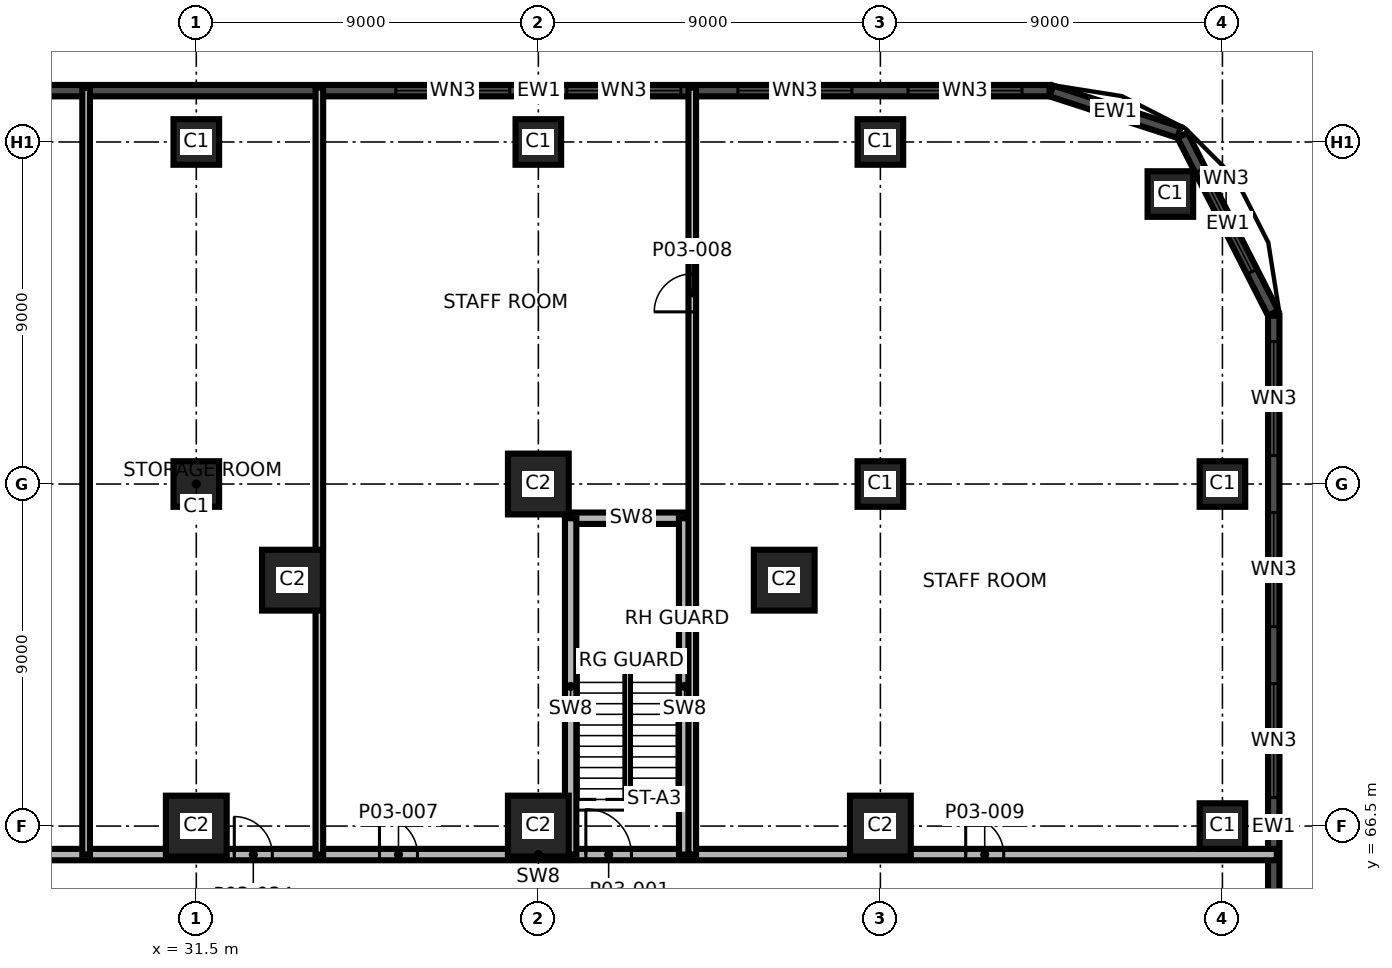
"""IFC4 building model, lengths in metres.
Left out: names, types, materials, properties, quantities, classifications, styles, units other than length and angle.
Written with IfcOpenShell. Run it as: python <this file> out.ifc"""

import sys

from ifc_helpers import new_model, si_unit, direction, frame, frame_2d, origin, origin_2d, place, context, subcontext, project, spatial, rectangle, extrude, element, fill, save


model = new_model("IFC4")
c1 = context("Model", 3, precision=1e-05, world=origin(), true_north=direction((0.0, 1.0)))
c2 = subcontext(c1, "Body", "Model", "MODEL_VIEW")
j1 = project(units=[si_unit("LENGTHUNIT", "METRE"), si_unit("PLANEANGLEUNIT", "RADIAN")], contexts=[c1])
p1 = place(None, origin())
s1 = spatial("IfcSite", under=j1, at=p1, CompositionType="ELEMENT")
p2 = place(p1, origin())
s2 = spatial("IfcBuilding", under=s1, at=p2, CompositionType="ELEMENT")
p3 = place(p2, frame((0.0, 0.0, 18.5)))
s3 = spatial("IfcBuildingStorey", under=s2, at=p3, CompositionType="ELEMENT", Elevation=18.5)
for number, where, z_axis, x_axis in (
    (1, (31.5, 66.5, 0.0), (0.0, 0.0, 1.0), (1.0, 0.0, 0.0)),
    (2, (40.5, 66.5, 0.0), (0.0, 0.0, 1.0), (1.0, 0.0, 0.0)),
    (3, (49.5, 66.5, 0.0), (0.0, 0.0, 1.0), (1.0, 0.0, 0.0)),
):
    element("IfcColumn", number, at=place(p3, frame(where, z_axis=z_axis, x_axis=x_axis)), inside=s3, PredefinedType="COLUMN", context=c2, shape_type="SweptSolid", body=[
        extrude(rectangle(XDim=1.6, YDim=1.6, at=origin_2d()), origin(), (0.0, 0.0, 1.0), 5.0),
    ])
for number, where, z_axis, x_axis in (
    (4, (58.5, 66.5, 0.0), (0.0, 0.0, 1.0), (1.0, 0.0, 0.0)),
    (5, (31.5, 75.5, 0.0), (0.0, 0.0, 1.0), (1.0, 0.0, 0.0)),
):
    element("IfcColumn", number, at=place(p3, frame(where, z_axis=z_axis, x_axis=x_axis)), inside=s3, PredefinedType="COLUMN", context=c2, shape_type="SweptSolid", body=[
        extrude(rectangle(XDim=1.2, YDim=1.2, at=origin_2d()), origin(), (0.0, 0.0, 1.0), 5.0),
    ])
p4 = place(p3, frame((40.5, 75.5, 0.0), z_axis=(0.0, 0.0, 1.0), x_axis=(1.0, 0.0, 0.0)))
e6 = element("IfcColumn", 6, at=p4, inside=s3, PredefinedType="COLUMN", context=c2, shape_type="SweptSolid", body=[
    extrude(rectangle(XDim=1.6, YDim=1.6, at=origin_2d()), origin(), (0.0, 0.0, 1.0), 5.0),
])
for number, where, z_axis, x_axis in (
    (7, (49.5, 75.5, 0.0), (0.0, 0.0, 1.0), (1.0, 0.0, 0.0)),
    (8, (58.5, 75.5, 0.0), (0.0, 0.0, 1.0), (1.0, 0.0, 0.0)),
    (9, (57.13, 83.13, 0.0), (0.0, 0.0, 1.0), (1.0, 0.0, 0.0)),
    (10, (31.5, 84.5, 0.0), (0.0, 0.0, 1.0), (1.0, 0.0, 0.0)),
    (11, (40.5, 84.5, 0.0), (0.0, 0.0, 1.0), (1.0, 0.0, 0.0)),
    (12, (49.5, 84.5, 0.0), (0.0, 0.0, 1.0), (1.0, 0.0, 0.0)),
):
    element("IfcColumn", number, at=place(p3, frame(where, z_axis=z_axis, x_axis=x_axis)), inside=s3, PredefinedType="COLUMN", context=c2, shape_type="SweptSolid", body=[
        extrude(rectangle(XDim=1.2, YDim=1.2, at=origin_2d()), origin(), (0.0, 0.0, 1.0), 5.0),
    ])
for number, where, z_axis, x_axis in (
    (13, (34.03, 72.97, 0.0), (0.0, 0.0, 1.0), (1.0, 0.0, 0.0)),
    (14, (46.97, 72.97, 0.0), (0.0, 0.0, 1.0), (1.0, 0.0, 0.0)),
):
    element("IfcColumn", number, at=place(p3, frame(where, z_axis=z_axis, x_axis=x_axis)), inside=s3, PredefinedType="COLUMN", context=c2, shape_type="SweptSolid", body=[
        extrude(rectangle(XDim=1.6, YDim=1.6, at=origin_2d()), origin(), (0.0, 0.0, 1.0), 5.0),
    ])
p5 = place(p3, frame((59.85, 53.0, 0.0), z_axis=(0.0, 0.0, 1.0), x_axis=(0.0, 1.0, 0.0)))
e15 = element("IfcWall", 15, at=p5, inside=s3, PredefinedType="SOLIDWALL", context=c2, shape_type="SweptSolid", body=[
    extrude(rectangle(XDim=26.928, YDim=0.3, at=frame_2d((13.464, 0.0))), origin(), (0.0, 0.0, 1.0), 4.7),
])
p6 = place(p5, frame((5.25, 0.0, 0.9)))
e16 = element("IfcOpeningElement", 16, at=p6, cuts=e15, PredefinedType="OPENING", context=c2, shape_type="SweptSolid", body=[
    extrude(rectangle(XDim=3.0, YDim=2.4, at=frame_2d((1.5, 1.2))), frame((0.0, 0.16, 0.0), z_axis=(0.0, -1.0, 0.0), x_axis=(1.0, 0.0, 0.0)), (0.0, 0.0, 1.0), 0.32),
])
p7 = place(p5, frame((14.25, 0.0, 0.9)))
e17 = element("IfcOpeningElement", 17, at=p7, cuts=e15, PredefinedType="OPENING", context=c2, shape_type="SweptSolid", body=[
    extrude(rectangle(XDim=3.0, YDim=2.4, at=frame_2d((1.5, 1.2))), frame((0.0, 0.16, 0.0), z_axis=(0.0, -1.0, 0.0), x_axis=(1.0, 0.0, 0.0)), (0.0, 0.0, 1.0), 0.32),
])
p8 = place(p5, frame((18.75, 0.0, 0.9)))
e18 = element("IfcOpeningElement", 18, at=p8, cuts=e15, PredefinedType="OPENING", context=c2, shape_type="SweptSolid", body=[
    extrude(rectangle(XDim=3.0, YDim=2.4, at=frame_2d((1.5, 1.2))), frame((0.0, 0.16, 0.0), z_axis=(0.0, -1.0, 0.0), x_axis=(1.0, 0.0, 0.0)), (0.0, 0.0, 1.0), 0.32),
])
p9 = place(p5, frame((23.25, 0.0, 0.9)))
e19 = element("IfcOpeningElement", 19, at=p9, cuts=e15, PredefinedType="OPENING", context=c2, shape_type="SweptSolid", body=[
    extrude(rectangle(XDim=3.0, YDim=2.4, at=frame_2d((1.5, 1.2))), frame((0.0, 0.16, 0.0), z_axis=(0.0, -1.0, 0.0), x_axis=(1.0, 0.0, 0.0)), (0.0, 0.0, 1.0), 0.32),
])
p10 = place(p3, frame((59.834, 79.996, 0.0), z_axis=(0.0, 0.0, 1.0), x_axis=(-0.454006562826, 0.890998339455, 0.0)))
e20 = element("IfcWall", 20, at=p10, inside=s3, PredefinedType="SOLIDWALL", context=c2, shape_type="SweptSolid", body=[
    extrude(rectangle(XDim=5.252, YDim=0.3, at=frame_2d((2.626, 0.0))), origin(), (0.0, 0.0, 1.0), 4.7),
])
p11 = place(p10, frame((1.224, 0.0, 0.9)))
e21 = element("IfcOpeningElement", 21, at=p11, cuts=e20, PredefinedType="OPENING", context=c2, shape_type="SweptSolid", body=[
    extrude(rectangle(XDim=3.0, YDim=2.4, at=frame_2d((1.5, 1.2))), frame((0.0, 0.16, 0.0), z_axis=(0.0, -1.0, 0.0), x_axis=(1.0, 0.0, 0.0)), (0.0, 0.0, 1.0), 0.32),
])
p12 = place(p3, frame((57.362, 84.75, 0.0), z_axis=(0.0, 0.0, 1.0), x_axis=(-0.951038127287, 0.309073584194, 0.0)))
e22 = element("IfcWall", 22, at=p12, inside=s3, PredefinedType="SOLIDWALL", context=c2, shape_type="SweptSolid", body=[
    extrude(rectangle(XDim=3.536, YDim=0.3, at=frame_2d((1.768, 0.0))), origin(), (0.0, 0.0, 1.0), 4.7),
])
p13 = place(p3, frame((53.952, 85.85, 0.0), z_axis=(0.0, 0.0, 1.0), x_axis=(-1.0, 0.0, 0.0)))
e23 = element("IfcWall", 23, at=p13, inside=s3, PredefinedType="SOLIDWALL", context=c2, shape_type="SweptSolid", body=[
    extrude(rectangle(XDim=26.88, YDim=0.3, at=frame_2d((13.44, 0.0))), origin(), (0.0, 0.0, 1.0), 4.7),
])
p14 = place(p13, frame((0.726, 0.0, 0.9)))
e24 = element("IfcOpeningElement", 24, at=p14, cuts=e23, PredefinedType="OPENING", context=c2, shape_type="SweptSolid", body=[
    extrude(rectangle(XDim=3.0, YDim=2.4, at=frame_2d((1.5, 1.2))), frame((0.0, 0.16, 0.0), z_axis=(0.0, -1.0, 0.0), x_axis=(1.0, 0.0, 0.0)), (0.0, 0.0, 1.0), 0.32),
])
p15 = place(p13, frame((5.202, 0.0, 0.9)))
e25 = element("IfcOpeningElement", 25, at=p15, cuts=e23, PredefinedType="OPENING", context=c2, shape_type="SweptSolid", body=[
    extrude(rectangle(XDim=3.0, YDim=2.4, at=frame_2d((1.5, 1.2))), frame((0.0, 0.16, 0.0), z_axis=(0.0, -1.0, 0.0), x_axis=(1.0, 0.0, 0.0)), (0.0, 0.0, 1.0), 0.32),
])
p16 = place(p13, frame((9.702, 0.0, 0.9)))
e26 = element("IfcOpeningElement", 26, at=p16, cuts=e23, PredefinedType="OPENING", context=c2, shape_type="SweptSolid", body=[
    extrude(rectangle(XDim=3.0, YDim=2.4, at=frame_2d((1.5, 1.2))), frame((0.0, 0.16, 0.0), z_axis=(0.0, -1.0, 0.0), x_axis=(1.0, 0.0, 0.0)), (0.0, 0.0, 1.0), 0.32),
])
p17 = place(p13, frame((14.202, 0.0, 0.9)))
e27 = element("IfcOpeningElement", 27, at=p17, cuts=e23, PredefinedType="OPENING", context=c2, shape_type="SweptSolid", body=[
    extrude(rectangle(XDim=3.0, YDim=2.4, at=frame_2d((1.5, 1.2))), frame((0.0, 0.16, 0.0), z_axis=(0.0, -1.0, 0.0), x_axis=(1.0, 0.0, 0.0)), (0.0, 0.0, 1.0), 0.32),
])
p18 = place(p3, frame((21.07, 65.75, 0.0), z_axis=(0.0, 0.0, 1.0), x_axis=(1.0, 0.0, 0.0)))
e28 = element("IfcWall", 28, at=p18, inside=s3, PredefinedType="SHEAR", context=c2, shape_type="SweptSolid", body=[
    extrude(rectangle(XDim=38.86, YDim=0.3, at=frame_2d((19.43, 0.0))), origin(), (0.0, 0.0, 1.0), 4.7),
])
p19 = place(p18, frame((20.68, 0.0, 0.0)))
e29 = element("IfcOpeningElement", 29, at=p19, cuts=e28, PredefinedType="OPENING", context=c2, shape_type="SweptSolid", body=[
    extrude(rectangle(XDim=1.2, YDim=2.1, at=frame_2d((0.6, 1.05))), frame((0.0, 0.16, 0.0), z_axis=(0.0, -1.0, 0.0), x_axis=(1.0, 0.0, 0.0)), (0.0, 0.0, 1.0), 0.32),
])
p20 = place(p18, frame((15.25, 0.0, 0.0)))
e30 = element("IfcOpeningElement", 30, at=p20, cuts=e28, PredefinedType="OPENING", context=c2, shape_type="SweptSolid", body=[
    extrude(rectangle(XDim=1.0, YDim=2.1, at=frame_2d((0.5, 1.05))), frame((0.0, 0.16, 0.0), z_axis=(0.0, -1.0, 0.0), x_axis=(1.0, 0.0, 0.0)), (0.0, 0.0, 1.0), 0.32),
])
p21 = place(p18, frame((30.675, 0.0, 0.0)))
e31 = element("IfcOpeningElement", 31, at=p21, cuts=e28, PredefinedType="OPENING", context=c2, shape_type="SweptSolid", body=[
    extrude(rectangle(XDim=1.0, YDim=2.1, at=frame_2d((0.5, 1.05))), frame((0.0, 0.16, 0.0), z_axis=(0.0, -1.0, 0.0), x_axis=(1.0, 0.0, 0.0)), (0.0, 0.0, 1.0), 0.32),
])
p22 = place(p18, frame((3.184, 0.0, 0.0)))
e32 = element("IfcOpeningElement", 32, at=p22, cuts=e28, PredefinedType="OPENING", context=c2, shape_type="SweptSolid", body=[
    extrude(rectangle(XDim=1.0, YDim=2.1, at=frame_2d((0.5, 1.05))), frame((0.0, 0.16, 0.0), z_axis=(0.0, -1.0, 0.0), x_axis=(1.0, 0.0, 0.0)), (0.0, 0.0, 1.0), 0.32),
])
p23 = place(p18, frame((11.43, 0.0, 0.0)))
e33 = element("IfcOpeningElement", 33, at=p23, cuts=e28, PredefinedType="OPENING", context=c2, shape_type="SweptSolid", body=[
    extrude(rectangle(XDim=1.0, YDim=2.1, at=frame_2d((0.5, 1.05))), frame((0.0, 0.16, 0.0), z_axis=(0.0, -1.0, 0.0), x_axis=(1.0, 0.0, 0.0)), (0.0, 0.0, 1.0), 0.32),
])
p24 = place(p3, frame((41.35, 74.6, 0.0), z_axis=(0.0, 0.0, 1.0), x_axis=(1.0, 0.0, 0.0)))
e34 = element("IfcWall", 34, at=p24, inside=s3, PredefinedType="SHEAR", context=c2, shape_type="SweptSolid", body=[
    extrude(rectangle(XDim=3.2, YDim=0.3, at=frame_2d((1.6, 0.0))), origin(), (0.0, 0.0, 1.0), 4.7),
])
for number, where, z_axis, x_axis in (
    (35, (28.601, 65.75, 0.0), (0.0, 0.0, 1.0), (0.0, 1.0, 0.0)),
    (36, (34.738, 65.75, 0.0), (0.0, 0.0, 1.0), (0.0, 1.0, 0.0)),
):
    element("IfcWall", number, at=place(p3, frame(where, z_axis=z_axis, x_axis=x_axis)), inside=s3, PredefinedType="PARTITIONING", context=c2, shape_type="SweptSolid", body=[
        extrude(rectangle(XDim=20.18, YDim=0.2, at=frame_2d((10.09, 0.0))), origin(), (0.0, 0.0, 1.0), 4.7),
    ])
for number, where, z_axis, x_axis in (
    (37, (41.35, 65.75, 0.0), (0.0, 0.0, 1.0), (0.0, 1.0, 0.0)),
    (38, (44.35, 65.75, 0.0), (0.0, 0.0, 1.0), (0.0, 1.0, 0.0)),
):
    element("IfcWall", number, at=place(p3, frame(where, z_axis=z_axis, x_axis=x_axis)), inside=s3, PredefinedType="SHEAR", context=c2, shape_type="SweptSolid", body=[
        extrude(rectangle(XDim=8.85, YDim=0.3, at=frame_2d((4.425, 0.0))), origin(), (0.0, 0.0, 1.0), 4.7),
    ])
p25 = place(p3, frame((44.55, 65.75, 0.0), z_axis=(0.0, 0.0, 1.0), x_axis=(0.0, 1.0, 0.0)))
e39 = element("IfcWall", 39, at=p25, inside=s3, PredefinedType="PARTITIONING", context=c2, shape_type="SweptSolid", body=[
    extrude(rectangle(XDim=20.18, YDim=0.2, at=frame_2d((10.09, 0.0))), origin(), (0.0, 0.0, 1.0), 4.7),
])
p26 = place(p25, frame((14.28, 0.0, 0.0)))
e40 = element("IfcOpeningElement", 40, at=p26, cuts=e39, PredefinedType="OPENING", context=c2, shape_type="SweptSolid", body=[
    extrude(rectangle(XDim=1.0, YDim=2.1, at=frame_2d((0.5, 1.05))), frame((0.0, 0.11, 0.0), z_axis=(0.0, -1.0, 0.0), x_axis=(1.0, 0.0, 0.0)), (0.0, 0.0, 1.0), 0.22),
])
p27 = place(p7, origin())
e41 = element("IfcWindow", 41, at=p27, inside=s3, PartitioningType="SINGLE_PANEL", PredefinedType="WINDOW", context=c2, shape_type="SweptSolid", body=[
    extrude(rectangle(XDim=3.0, YDim=2.4, at=frame_2d((1.5, 1.2))), frame((0.0, 0.03, 0.0), z_axis=(0.0, -1.0, 0.0), x_axis=(1.0, 0.0, 0.0)), (0.0, 0.0, 1.0), 0.06),
])
fill(e17, e41)
p28 = place(p8, origin())
e42 = element("IfcWindow", 42, at=p28, inside=s3, PartitioningType="SINGLE_PANEL", PredefinedType="WINDOW", context=c2, shape_type="SweptSolid", body=[
    extrude(rectangle(XDim=3.0, YDim=2.4, at=frame_2d((1.5, 1.2))), frame((0.0, 0.03, 0.0), z_axis=(0.0, -1.0, 0.0), x_axis=(1.0, 0.0, 0.0)), (0.0, 0.0, 1.0), 0.06),
])
fill(e18, e42)
p29 = place(p9, origin())
e43 = element("IfcWindow", 43, at=p29, inside=s3, PartitioningType="SINGLE_PANEL", PredefinedType="WINDOW", context=c2, shape_type="SweptSolid", body=[
    extrude(rectangle(XDim=3.0, YDim=2.4, at=frame_2d((1.5, 1.2))), frame((0.0, 0.03, 0.0), z_axis=(0.0, -1.0, 0.0), x_axis=(1.0, 0.0, 0.0)), (0.0, 0.0, 1.0), 0.06),
])
fill(e19, e43)
p30 = place(p11, origin())
e44 = element("IfcWindow", 44, at=p30, inside=s3, PartitioningType="SINGLE_PANEL", PredefinedType="WINDOW", context=c2, shape_type="SweptSolid", body=[
    extrude(rectangle(XDim=3.0, YDim=2.4, at=frame_2d((1.5, 1.2))), frame((0.0, 0.03, 0.0), z_axis=(0.0, -1.0, 0.0), x_axis=(1.0, 0.0, 0.0)), (0.0, 0.0, 1.0), 0.06),
])
fill(e21, e44)
p31 = place(p14, origin())
e45 = element("IfcWindow", 45, at=p31, inside=s3, PartitioningType="SINGLE_PANEL", PredefinedType="WINDOW", context=c2, shape_type="SweptSolid", body=[
    extrude(rectangle(XDim=3.0, YDim=2.4, at=frame_2d((1.5, 1.2))), frame((0.0, 0.03, 0.0), z_axis=(0.0, -1.0, 0.0), x_axis=(1.0, 0.0, 0.0)), (0.0, 0.0, 1.0), 0.06),
])
fill(e24, e45)
p32 = place(p15, origin())
e46 = element("IfcWindow", 46, at=p32, inside=s3, PartitioningType="SINGLE_PANEL", PredefinedType="WINDOW", context=c2, shape_type="SweptSolid", body=[
    extrude(rectangle(XDim=3.0, YDim=2.4, at=frame_2d((1.5, 1.2))), frame((0.0, 0.03, 0.0), z_axis=(0.0, -1.0, 0.0), x_axis=(1.0, 0.0, 0.0)), (0.0, 0.0, 1.0), 0.06),
])
fill(e25, e46)
p33 = place(p16, origin())
e47 = element("IfcWindow", 47, at=p33, inside=s3, PartitioningType="SINGLE_PANEL", PredefinedType="WINDOW", context=c2, shape_type="SweptSolid", body=[
    extrude(rectangle(XDim=3.0, YDim=2.4, at=frame_2d((1.5, 1.2))), frame((0.0, 0.03, 0.0), z_axis=(0.0, -1.0, 0.0), x_axis=(1.0, 0.0, 0.0)), (0.0, 0.0, 1.0), 0.06),
])
fill(e26, e47)
p34 = place(p17, origin())
e48 = element("IfcWindow", 48, at=p34, inside=s3, PartitioningType="SINGLE_PANEL", PredefinedType="WINDOW", context=c2, shape_type="SweptSolid", body=[
    extrude(rectangle(XDim=3.0, YDim=2.4, at=frame_2d((1.5, 1.2))), frame((0.0, 0.03, 0.0), z_axis=(0.0, -1.0, 0.0), x_axis=(1.0, 0.0, 0.0)), (0.0, 0.0, 1.0), 0.06),
])
fill(e27, e48)
p35 = place(p19, origin())
e49 = element("IfcDoor", 49, at=p35, inside=s3, OperationType="SINGLE_SWING_LEFT", PredefinedType="DOOR", context=c2, shape_type="SweptSolid", body=[
    extrude(rectangle(XDim=1.2, YDim=2.1, at=frame_2d((0.6, 1.05))), frame((0.0, 0.025, 0.0), z_axis=(0.0, -1.0, 0.0), x_axis=(1.0, 0.0, 0.0)), (0.0, 0.0, 1.0), 0.05),
])
fill(e29, e49)
p36 = place(p20, origin())
e50 = element("IfcDoor", 50, at=p36, inside=s3, OperationType="SINGLE_SWING_LEFT", PredefinedType="DOOR", context=c2, shape_type="SweptSolid", body=[
    extrude(rectangle(XDim=1.0, YDim=2.1, at=frame_2d((0.5, 1.05))), frame((0.0, 0.025, 0.0), z_axis=(0.0, -1.0, 0.0), x_axis=(1.0, 0.0, 0.0)), (0.0, 0.0, 1.0), 0.05),
])
fill(e30, e50)
p37 = place(p26, origin())
e51 = element("IfcDoor", 51, at=p37, inside=s3, OperationType="SINGLE_SWING_RIGHT", PredefinedType="DOOR", context=c2, shape_type="SweptSolid", body=[
    extrude(rectangle(XDim=1.0, YDim=2.1, at=frame_2d((0.5, 1.05))), frame((0.0, 0.025, 0.0), z_axis=(0.0, -1.0, 0.0), x_axis=(1.0, 0.0, 0.0)), (0.0, 0.0, 1.0), 0.05),
])
fill(e40, e51)
p38 = place(p21, origin())
e52 = element("IfcDoor", 52, at=p38, inside=s3, OperationType="SINGLE_SWING_LEFT", PredefinedType="DOOR", context=c2, shape_type="SweptSolid", body=[
    extrude(rectangle(XDim=1.0, YDim=2.1, at=frame_2d((0.5, 1.05))), frame((0.0, 0.025, 0.0), z_axis=(0.0, -1.0, 0.0), x_axis=(1.0, 0.0, 0.0)), (0.0, 0.0, 1.0), 0.05),
])
fill(e31, e52)
p39 = place(p23, origin())
e53 = element("IfcDoor", 53, at=p39, inside=s3, OperationType="SINGLE_SWING_RIGHT", PredefinedType="DOOR", context=c2, shape_type="SweptSolid", body=[
    extrude(rectangle(XDim=1.0, YDim=2.1, at=frame_2d((0.5, 1.05))), frame((0.0, 0.025, 0.0), z_axis=(0.0, -1.0, 0.0), x_axis=(1.0, 0.0, 0.0)), (0.0, 0.0, 1.0), 0.05),
])
fill(e33, e53)
save(model, sys.argv[1])
